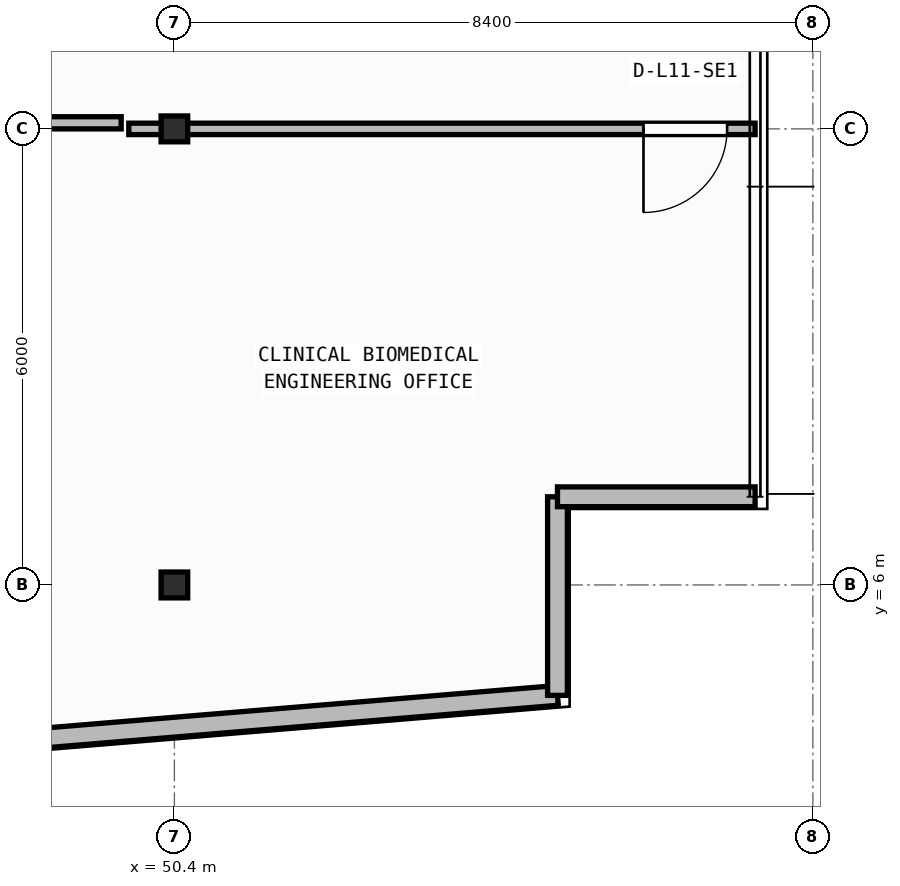
"""IFC4 building model, lengths in metres.
Left out: names, types, materials, properties, quantities, classifications, styles, units other than length and angle.
Written with IfcOpenShell. Run it as: python <this file> out.ifc"""

import sys

from ifc_helpers import new_model, si_unit, direction, frame, frame_2d, origin, origin_2d, place, context, subcontext, project, spatial, rectangle, i_section, extrude, element, fill, save


model = new_model("IFC4")
c1 = context("Model", 3, precision=1e-05, world=origin(), true_north=direction((0.0, 1.0)))
c2 = subcontext(c1, "Body", "Model", "MODEL_VIEW")
j1 = project(units=[si_unit("LENGTHUNIT", "METRE"), si_unit("PLANEANGLEUNIT", "RADIAN")], contexts=[c1])
p1 = place(None, origin())
s1 = spatial("IfcSite", under=j1, at=p1, CompositionType="ELEMENT")
p2 = place(p1, origin())
s2 = spatial("IfcBuilding", under=s1, at=p2, CompositionType="ELEMENT")
p3 = place(p2, frame((0.0, 0.0, 46.2)))
s3 = spatial("IfcBuildingStorey", under=s2, at=p3, CompositionType="ELEMENT", Elevation=46.2)
for number, where, z_axis, x_axis in (
    (1, (50.4, 6.0, 0.0), (0.0, 0.0, 1.0), (1.0, 0.0, 0.0)),
    (2, (50.4, 12.0, 0.0), (0.0, 0.0, 1.0), (1.0, 0.0, 0.0)),
):
    element("IfcColumn", number, at=place(p3, frame(where, z_axis=z_axis, x_axis=x_axis)), inside=s3, PredefinedType="COLUMN", context=c2, shape_type="SweptSolid", body=[
        extrude(i_section(OverallWidth=0.35, OverallDepth=0.34, WebThickness=0.016, FlangeThickness=0.028, at=origin_2d()), origin(), (0.0, 0.0, 1.0), 3.95),
    ])
p4 = place(p3, frame((2.76, 0.174, 0.0), z_axis=(0.0, 0.0, 1.0), x_axis=(0.996571478456, 0.082736257641, 0.0)))
e3 = element("IfcWall", 3, at=p4, inside=s3, PredefinedType="STANDARD", context=c2, shape_type="SweptSolid", body=[
    extrude(rectangle(XDim=52.861, YDim=0.26, at=frame_2d((26.431, 0.0))), origin(), (0.0, 0.0, 1.0), 3.71),
])
p5 = place(p4, frame((25.231, 0.0, 0.9)))
e4 = element("IfcOpeningElement", 4, at=p5, cuts=e3, PredefinedType="OPENING", context=c2, shape_type="SweptSolid", body=[
    extrude(rectangle(XDim=2.4, YDim=1.65, at=frame_2d((1.2, 0.825))), frame((0.0, 0.14, 0.0), z_axis=(0.0, -1.0, 0.0), x_axis=(1.0, 0.0, 0.0)), (0.0, 0.0, 1.0), 0.28),
])
p6 = place(p3, frame((55.44, 4.547, 0.0), z_axis=(0.0, 0.0, 1.0), x_axis=(0.0, 1.0, 0.0)))
e5 = element("IfcWall", 5, at=p6, inside=s3, PredefinedType="STANDARD", context=c2, shape_type="SweptSolid", body=[
    extrude(rectangle(XDim=2.613, YDim=0.26, at=frame_2d((1.306, 0.0))), origin(), (0.0, 0.0, 1.0), 3.71),
])
p7 = place(p3, frame((55.44, 7.16, 0.0), z_axis=(0.0, 0.0, 1.0), x_axis=(1.0, 0.0, 0.0)))
e6 = element("IfcWall", 6, at=p7, inside=s3, PredefinedType="STANDARD", context=c2, shape_type="SweptSolid", body=[
    extrude(rectangle(XDim=2.6, YDim=0.26, at=frame_2d((1.3, 0.0))), origin(), (0.0, 0.0, 1.0), 3.71),
])
p8 = place(p3, frame((58.04, 12.0, 0.0), z_axis=(0.0, 0.0, 1.0), x_axis=(-1.0, 0.0, 0.0)))
e7 = element("IfcWall", 7, at=p8, inside=s3, PredefinedType="PARTITIONING", context=c2, shape_type="SweptSolid", body=[
    extrude(rectangle(XDim=8.24, YDim=0.15, at=frame_2d((4.12, 0.0))), origin(), (0.0, 0.0, 1.0), 3.073),
])
p9 = place(p8, frame((0.368, 0.0, 0.0)))
e8 = element("IfcOpeningElement", 8, at=p9, cuts=e7, PredefinedType="OPENING", context=c2, shape_type="SweptSolid", body=[
    extrude(rectangle(XDim=1.1, YDim=2.1, at=frame_2d((0.55, 1.05))), frame((0.0, 0.085, 0.0), z_axis=(0.0, -1.0, 0.0), x_axis=(1.0, 0.0, 0.0)), (0.0, 0.0, 1.0), 0.17),
])
p10 = place(p3, frame((46.689, 12.08, 0.0), z_axis=(0.0, 0.0, 1.0), x_axis=(1.0, 0.0, 0.0)))
e9 = element("IfcWall", 9, at=p10, inside=s3, PredefinedType="PARTITIONING", context=c2, shape_type="SweptSolid", body=[
    extrude(rectangle(XDim=3.011, YDim=0.16, at=frame_2d((1.505, 0.0))), origin(), (0.0, 0.0, 1.0), 3.073),
])
p11 = place(p9, origin())
e10 = element("IfcDoor", 10, at=p11, inside=s3, OperationType="SINGLE_SWING_RIGHT", PredefinedType="DOOR", context=c2, shape_type="SweptSolid", body=[
    extrude(rectangle(XDim=1.1, YDim=2.1, at=frame_2d((0.55, 1.05))), frame((0.0, 0.025, 0.0), z_axis=(0.0, -1.0, 0.0), x_axis=(1.0, 0.0, 0.0)), (0.0, 0.0, 1.0), 0.05),
])
fill(e8, e10)
save(model, sys.argv[1])
